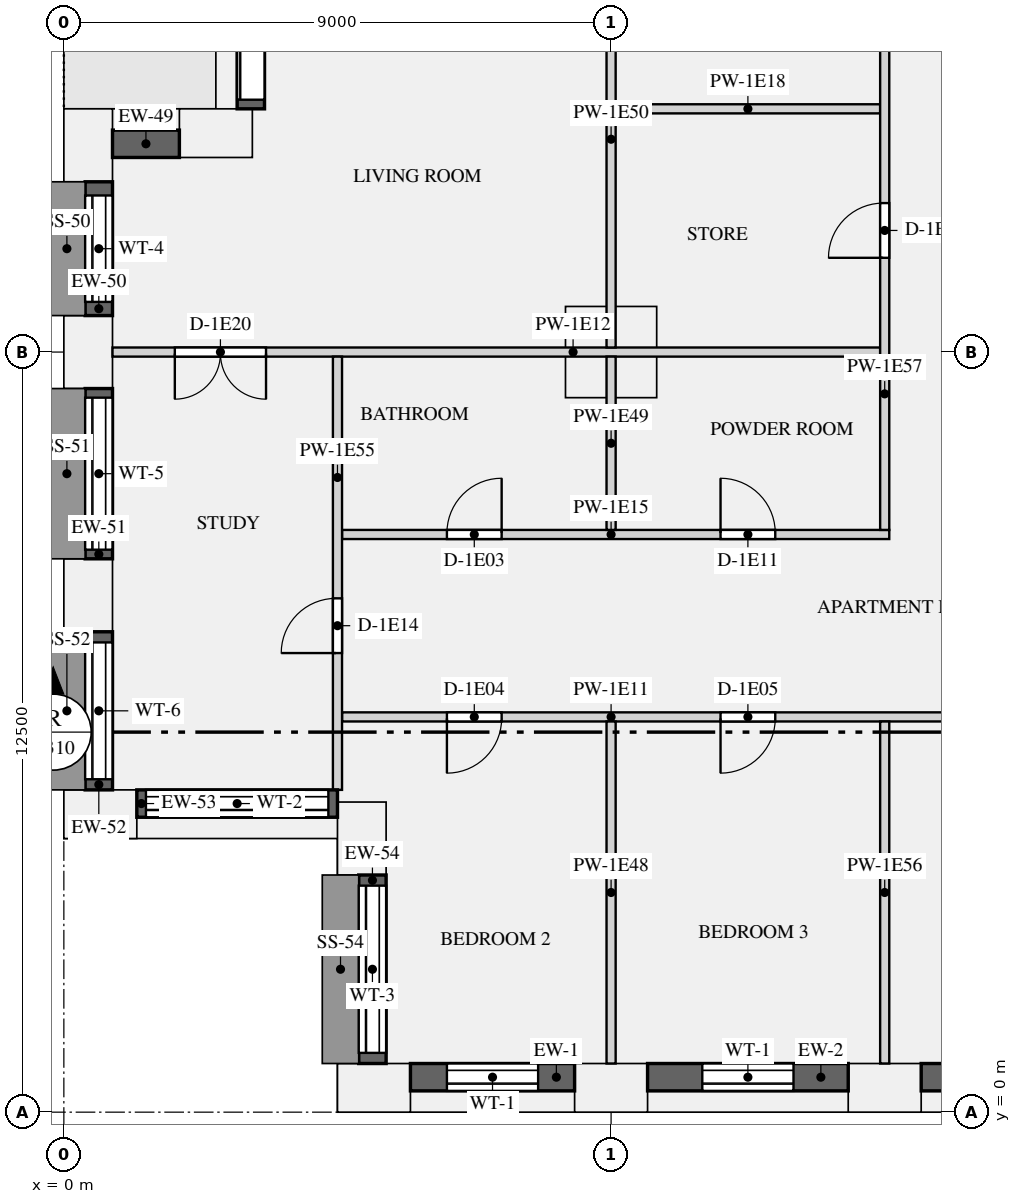
"""IFC4 building model, lengths in metres.
Left out: names, types, materials, properties, quantities, classifications, styles, units other than length and angle.
Written with IfcOpenShell. Run it as: python <this file> out.ifc"""

import sys

from ifc_helpers import new_model, si_unit, direction, frame, frame_2d, origin, origin_2d, place, context, subcontext, project, spatial, rectangle, extrude, element, fill, save


model = new_model("IFC4")
c1 = context("Model", 3, precision=1e-05, world=origin(), true_north=direction((0.0, 1.0)))
c2 = subcontext(c1, "Body", "Model", "MODEL_VIEW")
j1 = project(units=[si_unit("LENGTHUNIT", "METRE"), si_unit("PLANEANGLEUNIT", "RADIAN")], contexts=[c1])
p1 = place(None, origin())
s1 = spatial("IfcSite", under=j1, at=p1, CompositionType="ELEMENT")
p2 = place(p1, origin())
s2 = spatial("IfcBuilding", under=s1, at=p2, CompositionType="ELEMENT")
p3 = place(p2, frame((0.0, 0.0, 54.15)))
s3 = spatial("IfcBuildingStorey", under=s2, at=p3, CompositionType="ELEMENT", Elevation=54.15)
for number, where, z_axis, x_axis in (
    (1, (5.1, 0.4, 0.0), (0.0, 0.0, 1.0), (1.0, 0.0, 0.0)),
    (2, (9.0, 0.4, 0.0), (0.0, 0.0, 1.0), (1.0, 0.0, 0.0)),
    (3, (13.5, 0.4, 0.0), (0.0, 0.0, 1.0), (1.0, 0.0, 0.0)),
    (4, (2.5, 16.1, 0.0), (0.0, 0.0, 1.0), (-1.0, 0.0, 0.0)),
    (5, (0.4, 15.9, 0.0), (0.0, 0.0, 1.0), (0.0, -1.0, 0.0)),
    (6, (0.4, 12.5, 0.0), (0.0, 0.0, 1.0), (0.0, -1.0, 0.0)),
    (7, (0.4, 8.5, 0.0), (0.0, 0.0, 1.0), (0.0, -1.0, 0.0)),
    (8, (0.6, 4.9, 0.0), (0.0, 0.0, 1.0), (1.0, 0.0, 0.0)),
    (9, (4.9, 4.5, 0.0), (0.0, 0.0, 1.0), (0.0, -1.0, 0.0)),
):
    element("IfcColumn", number, at=place(p3, frame(where, z_axis=z_axis, x_axis=x_axis)), inside=s3, PredefinedType="USERDEFINED", context=c2, shape_type="SweptSolid", body=[
        extrude(rectangle(XDim=1.2, YDim=0.8, at=origin_2d()), origin(), (0.0, 0.0, 1.0), 3.15),
    ])
p4 = place(p3, frame((9.0, 12.5, 0.0), z_axis=(0.0, 0.0, 1.0), x_axis=(1.0, 0.0, 0.0)))
e10 = element("IfcColumn", 10, at=p4, inside=s3, PredefinedType="COLUMN", context=c2, shape_type="SweptSolid", body=[
    extrude(rectangle(XDim=1.5, YDim=1.5, at=origin_2d()), origin(), (0.0, 0.0, 1.0), 3.15),
])
p5 = place(p3, frame((5.7, 0.575, 0.9), z_axis=(0.0, 0.0, 1.0), x_axis=(1.0, 0.0, 0.0)))
e11 = element("IfcWall", 11, at=p5, inside=s3, PredefinedType="SOLIDWALL", context=c2, shape_type="SweptSolid", body=[
    extrude(rectangle(XDim=2.7, YDim=0.45, at=frame_2d((1.35, 0.0))), origin(), (0.0, 0.0, 1.0), 1.93),
])
p6 = place(p5, frame((0.6, 0.0, 0.15)))
e12 = element("IfcOpeningElement", 12, at=p6, cuts=e11, PredefinedType="OPENING", context=c2, shape_type="SweptSolid", body=[
    extrude(rectangle(XDim=1.5, YDim=1.5, at=frame_2d((0.75, 0.75))), frame((0.0, 0.235, 0.0), z_axis=(0.0, -1.0, 0.0), x_axis=(1.0, 0.0, 0.0)), (0.0, 0.0, 1.0), 0.47),
])
p7 = place(p3, frame((9.6, 0.575, 0.9), z_axis=(0.0, 0.0, 1.0), x_axis=(1.0, 0.0, 0.0)))
e13 = element("IfcWall", 13, at=p7, inside=s3, PredefinedType="SOLIDWALL", context=c2, shape_type="SweptSolid", body=[
    extrude(rectangle(XDim=3.3, YDim=0.45, at=frame_2d((1.65, 0.0))), origin(), (0.0, 0.0, 1.0), 1.93),
])
p8 = place(p7, frame((0.9, 0.0, 0.15)))
e14 = element("IfcOpeningElement", 14, at=p8, cuts=e13, PredefinedType="OPENING", context=c2, shape_type="SweptSolid", body=[
    extrude(rectangle(XDim=1.5, YDim=1.5, at=frame_2d((0.75, 0.75))), frame((0.0, 0.235, 0.0), z_axis=(0.0, -1.0, 0.0), x_axis=(1.0, 0.0, 0.0)), (0.0, 0.0, 1.0), 0.47),
])
p9 = place(p3, frame((14.1, 0.575, 0.9), z_axis=(0.0, 0.0, 1.0), x_axis=(1.0, 0.0, 0.0)))
e15 = element("IfcWall", 15, at=p9, inside=s3, PredefinedType="SOLIDWALL", context=c2, shape_type="SweptSolid", body=[
    extrude(rectangle(XDim=3.9, YDim=0.45, at=frame_2d((1.95, 0.0))), origin(), (0.0, 0.0, 1.0), 1.93),
])
p10 = place(p9, frame((1.2, 0.0, 0.15)))
e16 = element("IfcOpeningElement", 16, at=p10, cuts=e15, PredefinedType="OPENING", context=c2, shape_type="SweptSolid", body=[
    extrude(rectangle(XDim=1.5, YDim=1.5, at=frame_2d((0.75, 0.75))), frame((0.0, 0.235, 0.0), z_axis=(0.0, -1.0, 0.0), x_axis=(1.0, 0.0, 0.0)), (0.0, 0.0, 1.0), 0.47),
])
p11 = place(p3, frame((3.075, 19.9, 0.0), z_axis=(0.0, 0.0, 1.0), x_axis=(0.0, -1.0, 0.0)))
e17 = element("IfcWall", 17, at=p11, inside=s3, PredefinedType="SOLIDWALL", context=c2, shape_type="SweptSolid", body=[
    extrude(rectangle(XDim=3.4, YDim=0.45, at=frame_2d((1.7, 0.0))), origin(), (0.0, 0.0, 1.0), 2.83),
])
p12 = place(p11, frame((0.15, 0.0, 0.0)))
e18 = element("IfcOpeningElement", 18, at=p12, cuts=e17, PredefinedType="OPENING", context=c2, shape_type="SweptSolid", body=[
    extrude(rectangle(XDim=3.1, YDim=2.3, at=frame_2d((1.55, 1.15))), frame((0.0, 0.235, 0.0), z_axis=(0.0, -1.0, 0.0), x_axis=(1.0, 0.0, 0.0)), (0.0, 0.0, 1.0), 0.47),
])
p13 = place(p3, frame((1.9, 15.925, 0.9), z_axis=(0.0, 0.0, 1.0), x_axis=(-1.0, 0.0, 0.0)))
e19 = element("IfcWall", 19, at=p13, inside=s3, PredefinedType="SOLIDWALL", context=c2, shape_type="SweptSolid", body=[
    extrude(rectangle(XDim=1.1, YDim=0.45, at=frame_2d((0.55, 0.0))), origin(), (0.0, 0.0, 1.0), 1.93),
])
p14 = place(p3, frame((0.575, 15.3, 0.9), z_axis=(0.0, 0.0, 1.0), x_axis=(0.0, -1.0, 0.0)))
e20 = element("IfcWall", 20, at=p14, inside=s3, PredefinedType="SOLIDWALL", context=c2, shape_type="SweptSolid", body=[
    extrude(rectangle(XDim=2.2, YDim=0.45, at=frame_2d((1.1, 0.0))), origin(), (0.0, 0.0, 1.0), 1.93),
])
p15 = place(p14, frame((0.225, 0.0, 0.15)))
e21 = element("IfcOpeningElement", 21, at=p15, cuts=e20, PredefinedType="OPENING", context=c2, shape_type="SweptSolid", body=[
    extrude(rectangle(XDim=1.75, YDim=1.5, at=frame_2d((0.875, 0.75))), frame((0.0, 0.235, 0.0), z_axis=(0.0, -1.0, 0.0), x_axis=(1.0, 0.0, 0.0)), (0.0, 0.0, 1.0), 0.47),
])
p16 = place(p3, frame((0.575, 11.9, 0.9), z_axis=(0.0, 0.0, 1.0), x_axis=(0.0, -1.0, 0.0)))
e22 = element("IfcWall", 22, at=p16, inside=s3, PredefinedType="SOLIDWALL", context=c2, shape_type="SweptSolid", body=[
    extrude(rectangle(XDim=2.8, YDim=0.45, at=frame_2d((1.4, 0.0))), origin(), (0.0, 0.0, 1.0), 1.93),
])
p17 = place(p16, frame((0.15, 0.0, 0.15)))
e23 = element("IfcOpeningElement", 23, at=p17, cuts=e22, PredefinedType="OPENING", context=c2, shape_type="SweptSolid", body=[
    extrude(rectangle(XDim=2.5, YDim=1.5, at=frame_2d((1.25, 0.75))), frame((0.0, 0.235, 0.0), z_axis=(0.0, -1.0, 0.0), x_axis=(1.0, 0.0, 0.0)), (0.0, 0.0, 1.0), 0.47),
])
p18 = place(p3, frame((0.575, 7.9, 0.9), z_axis=(0.0, 0.0, 1.0), x_axis=(0.0, -1.0, 0.0)))
e24 = element("IfcWall", 24, at=p18, inside=s3, PredefinedType="SOLIDWALL", context=c2, shape_type="SweptSolid", body=[
    extrude(rectangle(XDim=2.6, YDim=0.45, at=frame_2d((1.3, 0.0))), origin(), (0.0, 0.0, 1.0), 1.93),
])
p19 = place(p18, frame((0.175, 0.0, 0.15)))
e25 = element("IfcOpeningElement", 25, at=p19, cuts=e24, PredefinedType="OPENING", context=c2, shape_type="SweptSolid", body=[
    extrude(rectangle(XDim=2.25, YDim=1.5, at=frame_2d((1.125, 0.75))), frame((0.0, 0.235, 0.0), z_axis=(0.0, -1.0, 0.0), x_axis=(1.0, 0.0, 0.0)), (0.0, 0.0, 1.0), 0.47),
])
p20 = place(p3, frame((1.2, 5.075, 0.9), z_axis=(0.0, 0.0, 1.0), x_axis=(1.0, 0.0, 0.0)))
e26 = element("IfcWall", 26, at=p20, inside=s3, PredefinedType="SOLIDWALL", context=c2, shape_type="SweptSolid", body=[
    extrude(rectangle(XDim=3.3, YDim=0.45, at=frame_2d((1.65, 0.0))), origin(), (0.0, 0.0, 1.0), 1.93),
])
p21 = place(p20, frame((0.15, 0.0, 0.15)))
e27 = element("IfcOpeningElement", 27, at=p21, cuts=e26, PredefinedType="OPENING", context=c2, shape_type="SweptSolid", body=[
    extrude(rectangle(XDim=3.0, YDim=1.5, at=frame_2d((1.5, 0.75))), frame((0.0, 0.235, 0.0), z_axis=(0.0, -1.0, 0.0), x_axis=(1.0, 0.0, 0.0)), (0.0, 0.0, 1.0), 0.47),
])
p22 = place(p3, frame((5.075, 3.9, 0.9), z_axis=(0.0, 0.0, 1.0), x_axis=(0.0, -1.0, 0.0)))
e28 = element("IfcWall", 28, at=p22, inside=s3, PredefinedType="SOLIDWALL", context=c2, shape_type="SweptSolid", body=[
    extrude(rectangle(XDim=3.1, YDim=0.45, at=frame_2d((1.55, 0.0))), origin(), (0.0, 0.0, 1.0), 1.93),
])
p23 = place(p22, frame((0.175, 0.0, 0.15)))
e29 = element("IfcOpeningElement", 29, at=p23, cuts=e28, PredefinedType="OPENING", context=c2, shape_type="SweptSolid", body=[
    extrude(rectangle(XDim=2.75, YDim=1.5, at=frame_2d((1.375, 0.75))), frame((0.0, 0.235, 0.0), z_axis=(0.0, -1.0, 0.0), x_axis=(1.0, 0.0, 0.0)), (0.0, 0.0, 1.0), 0.47),
])
p24 = place(p3, frame((4.575, 6.5, 0.0), z_axis=(0.0, 0.0, 1.0), x_axis=(1.0, 0.0, 0.0)))
e30 = element("IfcWall", 30, at=p24, inside=s3, PredefinedType="PARTITIONING", context=c2, shape_type="SweptSolid", body=[
    extrude(rectangle(XDim=13.425, YDim=0.15, at=frame_2d((6.712, 0.0))), origin(), (0.0, 0.0, 1.0), 2.83),
])
p25 = place(p24, frame((1.725, 0.0, 0.0)))
e31 = element("IfcOpeningElement", 31, at=p25, cuts=e30, PredefinedType="OPENING", context=c2, shape_type="SweptSolid", body=[
    extrude(rectangle(XDim=0.9, YDim=2.1, at=frame_2d((0.45, 1.05))), frame((0.0, 0.085, 0.0), z_axis=(0.0, -1.0, 0.0), x_axis=(1.0, 0.0, 0.0)), (0.0, 0.0, 1.0), 0.17),
])
p26 = place(p24, frame((6.225, 0.0, 0.0)))
e32 = element("IfcOpeningElement", 32, at=p26, cuts=e30, PredefinedType="OPENING", context=c2, shape_type="SweptSolid", body=[
    extrude(rectangle(XDim=0.9, YDim=2.1, at=frame_2d((0.45, 1.05))), frame((0.0, 0.085, 0.0), z_axis=(0.0, -1.0, 0.0), x_axis=(1.0, 0.0, 0.0)), (0.0, 0.0, 1.0), 0.17),
])
p27 = place(p24, frame((10.725, 0.0, 0.0)))
e33 = element("IfcOpeningElement", 33, at=p27, cuts=e30, PredefinedType="OPENING", context=c2, shape_type="SweptSolid", body=[
    extrude(rectangle(XDim=0.9, YDim=2.1, at=frame_2d((0.45, 1.05))), frame((0.0, 0.085, 0.0), z_axis=(0.0, -1.0, 0.0), x_axis=(1.0, 0.0, 0.0)), (0.0, 0.0, 1.0), 0.17),
])
p28 = place(p3, frame((0.8, 12.5, 0.0), z_axis=(0.0, 0.0, 1.0), x_axis=(1.0, 0.0, 0.0)))
e34 = element("IfcWall", 34, at=p28, inside=s3, PredefinedType="PARTITIONING", context=c2, shape_type="SweptSolid", body=[
    extrude(rectangle(XDim=12.625, YDim=0.15, at=frame_2d((6.312, 0.0))), origin(), (0.0, 0.0, 1.0), 2.83),
])
p29 = place(p28, frame((1.025, 0.0, 0.0)))
e35 = element("IfcOpeningElement", 35, at=p29, cuts=e34, PredefinedType="OPENING", context=c2, shape_type="SweptSolid", body=[
    extrude(rectangle(XDim=1.5, YDim=2.1, at=frame_2d((0.75, 1.05))), frame((0.0, 0.085, 0.0), z_axis=(0.0, -1.0, 0.0), x_axis=(1.0, 0.0, 0.0)), (0.0, 0.0, 1.0), 0.17),
])
p30 = place(p3, frame((4.575, 9.5, 0.0), z_axis=(0.0, 0.0, 1.0), x_axis=(1.0, 0.0, 0.0)))
e36 = element("IfcWall", 36, at=p30, inside=s3, PredefinedType="PARTITIONING", context=c2, shape_type="SweptSolid", body=[
    extrude(rectangle(XDim=9.0, YDim=0.15, at=frame_2d((4.5, 0.0))), origin(), (0.0, 0.0, 1.0), 2.83),
])
p31 = place(p30, frame((1.725, 0.0, 0.0)))
e37 = element("IfcOpeningElement", 37, at=p31, cuts=e36, PredefinedType="OPENING", context=c2, shape_type="SweptSolid", body=[
    extrude(rectangle(XDim=0.9, YDim=2.1, at=frame_2d((0.45, 1.05))), frame((0.0, 0.085, 0.0), z_axis=(0.0, -1.0, 0.0), x_axis=(1.0, 0.0, 0.0)), (0.0, 0.0, 1.0), 0.17),
])
p32 = place(p30, frame((6.225, 0.0, 0.0)))
e38 = element("IfcOpeningElement", 38, at=p32, cuts=e36, PredefinedType="OPENING", context=c2, shape_type="SweptSolid", body=[
    extrude(rectangle(XDim=0.9, YDim=2.1, at=frame_2d((0.45, 1.05))), frame((0.0, 0.085, 0.0), z_axis=(0.0, -1.0, 0.0), x_axis=(1.0, 0.0, 0.0)), (0.0, 0.0, 1.0), 0.17),
])
p33 = place(p3, frame((9.075, 16.5, 0.0), z_axis=(0.0, 0.0, 1.0), x_axis=(1.0, 0.0, 0.0)))
e39 = element("IfcWall", 39, at=p33, inside=s3, PredefinedType="PARTITIONING", context=c2, shape_type="SweptSolid", body=[
    extrude(rectangle(XDim=4.35, YDim=0.15, at=frame_2d((2.175, 0.0))), origin(), (0.0, 0.0, 1.0), 2.83),
])
p34 = place(p3, frame((9.0, 0.8, 0.0), z_axis=(0.0, 0.0, 1.0), x_axis=(0.0, 1.0, 0.0)))
e40 = element("IfcWall", 40, at=p34, inside=s3, PredefinedType="PARTITIONING", context=c2, shape_type="SweptSolid", body=[
    extrude(rectangle(XDim=5.625, YDim=0.15, at=frame_2d((2.812, 0.0))), origin(), (0.0, 0.0, 1.0), 2.83),
])
p35 = place(p3, frame((9.0, 9.575, 0.0), z_axis=(0.0, 0.0, 1.0), x_axis=(0.0, 1.0, 0.0)))
e41 = element("IfcWall", 41, at=p35, inside=s3, PredefinedType="PARTITIONING", context=c2, shape_type="SweptSolid", body=[
    extrude(rectangle(XDim=2.85, YDim=0.15, at=frame_2d((1.425, 0.0))), origin(), (0.0, 0.0, 1.0), 2.83),
])
p36 = place(p3, frame((9.0, 12.575, 0.0), z_axis=(0.0, 0.0, 1.0), x_axis=(0.0, 1.0, 0.0)))
e42 = element("IfcWall", 42, at=p36, inside=s3, PredefinedType="PARTITIONING", context=c2, shape_type="SweptSolid", body=[
    extrude(rectangle(XDim=11.35, YDim=0.15, at=frame_2d((5.675, 0.0))), origin(), (0.0, 0.0, 1.0), 2.83),
])
p37 = place(p36, frame((6.85, 0.0, 0.0)))
e43 = element("IfcOpeningElement", 43, at=p37, cuts=e42, PredefinedType="OPENING", context=c2, shape_type="SweptSolid", body=[
    extrude(rectangle(XDim=0.9, YDim=2.1, at=frame_2d((0.45, 1.05))), frame((0.0, 0.085, 0.0), z_axis=(0.0, -1.0, 0.0), x_axis=(1.0, 0.0, 0.0)), (0.0, 0.0, 1.0), 0.17),
])
p38 = place(p3, frame((4.5, 5.3, 0.0), z_axis=(0.0, 0.0, 1.0), x_axis=(0.0, 1.0, 0.0)))
e44 = element("IfcWall", 44, at=p38, inside=s3, PredefinedType="PARTITIONING", context=c2, shape_type="SweptSolid", body=[
    extrude(rectangle(XDim=7.125, YDim=0.15, at=frame_2d((3.562, 0.0))), origin(), (0.0, 0.0, 1.0), 2.83),
])
p39 = place(p38, frame((2.25, 0.0, 0.0)))
e45 = element("IfcOpeningElement", 45, at=p39, cuts=e44, PredefinedType="OPENING", context=c2, shape_type="SweptSolid", body=[
    extrude(rectangle(XDim=0.9, YDim=2.1, at=frame_2d((0.45, 1.05))), frame((0.0, 0.085, 0.0), z_axis=(0.0, -1.0, 0.0), x_axis=(1.0, 0.0, 0.0)), (0.0, 0.0, 1.0), 0.17),
])
p40 = place(p3, frame((13.5, 0.8, 0.0), z_axis=(0.0, 0.0, 1.0), x_axis=(0.0, 1.0, 0.0)))
e46 = element("IfcWall", 46, at=p40, inside=s3, PredefinedType="PARTITIONING", context=c2, shape_type="SweptSolid", body=[
    extrude(rectangle(XDim=5.625, YDim=0.15, at=frame_2d((2.812, 0.0))), origin(), (0.0, 0.0, 1.0), 2.83),
])
p41 = place(p3, frame((13.5, 9.575, 0.0), z_axis=(0.0, 0.0, 1.0), x_axis=(0.0, 1.0, 0.0)))
e47 = element("IfcWall", 47, at=p41, inside=s3, PredefinedType="PARTITIONING", context=c2, shape_type="SweptSolid", body=[
    extrude(rectangle(XDim=13.325, YDim=0.15, at=frame_2d((6.663, 0.0))), origin(), (0.0, 0.0, 1.0), 2.83),
])
p42 = place(p41, frame((8.475, 0.0, 0.0)))
e48 = element("IfcOpeningElement", 48, at=p42, cuts=e47, PredefinedType="OPENING", context=c2, shape_type="SweptSolid", body=[
    extrude(rectangle(XDim=0.9, YDim=2.1, at=frame_2d((0.45, 1.05))), frame((0.0, 0.085, 0.0), z_axis=(0.0, -1.0, 0.0), x_axis=(1.0, 0.0, 0.0)), (0.0, 0.0, 1.0), 0.17),
])
p43 = place(p41, frame((4.475, 0.0, 0.0)))
e49 = element("IfcOpeningElement", 49, at=p43, cuts=e47, PredefinedType="OPENING", context=c2, shape_type="SweptSolid", body=[
    extrude(rectangle(XDim=0.9, YDim=2.1, at=frame_2d((0.45, 1.05))), frame((0.0, 0.085, 0.0), z_axis=(0.0, -1.0, 0.0), x_axis=(1.0, 0.0, 0.0)), (0.0, 0.0, 1.0), 0.17),
])
p44 = place(p6, origin())
e50 = element("IfcWindow", 50, at=p44, inside=s3, PartitioningType="SINGLE_PANEL", PredefinedType="WINDOW", context=c2, shape_type="SweptSolid", body=[
    extrude(rectangle(XDim=1.5, YDim=1.5, at=frame_2d((0.75, 0.75))), frame((0.0, -0.065, 0.0), z_axis=(0.0, -1.0, 0.0), x_axis=(1.0, 0.0, 0.0)), (0.0, 0.0, 1.0), 0.06),
])
fill(e12, e50)
p45 = place(p8, origin())
e51 = element("IfcWindow", 51, at=p45, inside=s3, PartitioningType="SINGLE_PANEL", PredefinedType="WINDOW", context=c2, shape_type="SweptSolid", body=[
    extrude(rectangle(XDim=1.5, YDim=1.5, at=frame_2d((0.75, 0.75))), frame((0.0, -0.065, 0.0), z_axis=(0.0, -1.0, 0.0), x_axis=(1.0, 0.0, 0.0)), (0.0, 0.0, 1.0), 0.06),
])
fill(e14, e51)
p46 = place(p12, origin())
e52 = element("IfcDoor", 52, at=p46, inside=s3, OperationType="SLIDING_TO_LEFT", PredefinedType="DOOR", context=c2, shape_type="SweptSolid", body=[
    extrude(rectangle(XDim=3.1, YDim=2.3, at=frame_2d((1.55, 1.15))), frame((0.0, -0.07, 0.0), z_axis=(0.0, -1.0, 0.0), x_axis=(1.0, 0.0, 0.0)), (0.0, 0.0, 1.0), 0.05),
])
fill(e18, e52)
p47 = place(p15, origin())
e53 = element("IfcWindow", 53, at=p47, inside=s3, PartitioningType="SINGLE_PANEL", PredefinedType="WINDOW", context=c2, shape_type="SweptSolid", body=[
    extrude(rectangle(XDim=1.75, YDim=1.5, at=frame_2d((0.875, 0.75))), frame((0.0, -0.065, 0.0), z_axis=(0.0, -1.0, 0.0), x_axis=(1.0, 0.0, 0.0)), (0.0, 0.0, 1.0), 0.06),
])
fill(e21, e53)
p48 = place(p17, origin())
e54 = element("IfcWindow", 54, at=p48, inside=s3, PartitioningType="SINGLE_PANEL", PredefinedType="WINDOW", context=c2, shape_type="SweptSolid", body=[
    extrude(rectangle(XDim=2.5, YDim=1.5, at=frame_2d((1.25, 0.75))), frame((0.0, -0.065, 0.0), z_axis=(0.0, -1.0, 0.0), x_axis=(1.0, 0.0, 0.0)), (0.0, 0.0, 1.0), 0.06),
])
fill(e23, e54)
p49 = place(p19, origin())
e55 = element("IfcWindow", 55, at=p49, inside=s3, PartitioningType="SINGLE_PANEL", PredefinedType="WINDOW", context=c2, shape_type="SweptSolid", body=[
    extrude(rectangle(XDim=2.25, YDim=1.5, at=frame_2d((1.125, 0.75))), frame((0.0, -0.065, 0.0), z_axis=(0.0, -1.0, 0.0), x_axis=(1.0, 0.0, 0.0)), (0.0, 0.0, 1.0), 0.06),
])
fill(e25, e55)
p50 = place(p21, origin())
e56 = element("IfcWindow", 56, at=p50, inside=s3, PartitioningType="SINGLE_PANEL", PredefinedType="WINDOW", context=c2, shape_type="SweptSolid", body=[
    extrude(rectangle(XDim=3.0, YDim=1.5, at=frame_2d((1.5, 0.75))), frame((0.0, -0.065, 0.0), z_axis=(0.0, -1.0, 0.0), x_axis=(1.0, 0.0, 0.0)), (0.0, 0.0, 1.0), 0.06),
])
fill(e27, e56)
p51 = place(p23, origin())
e57 = element("IfcWindow", 57, at=p51, inside=s3, PartitioningType="SINGLE_PANEL", PredefinedType="WINDOW", context=c2, shape_type="SweptSolid", body=[
    extrude(rectangle(XDim=2.75, YDim=1.5, at=frame_2d((1.375, 0.75))), frame((0.0, -0.065, 0.0), z_axis=(0.0, -1.0, 0.0), x_axis=(1.0, 0.0, 0.0)), (0.0, 0.0, 1.0), 0.06),
])
fill(e29, e57)
p52 = place(p31, origin())
e58 = element("IfcDoor", 58, at=p52, inside=s3, OperationType="SINGLE_SWING_RIGHT", PredefinedType="DOOR", context=c2, shape_type="SweptSolid", body=[
    extrude(rectangle(XDim=0.9, YDim=2.1, at=frame_2d((0.45, 1.05))), frame((0.0, 0.025, 0.0), z_axis=(0.0, -1.0, 0.0), x_axis=(1.0, 0.0, 0.0)), (0.0, 0.0, 1.0), 0.05),
])
fill(e37, e58)
p53 = place(p25, frame((0.9, 0.0, 0.0), z_axis=(0.0, 0.0, 1.0), x_axis=(-1.0, 0.0, 0.0)))
e59 = element("IfcDoor", 59, at=p53, inside=s3, OperationType="SINGLE_SWING_RIGHT", PredefinedType="DOOR", context=c2, shape_type="SweptSolid", body=[
    extrude(rectangle(XDim=0.9, YDim=2.1, at=frame_2d((0.45, 1.05))), frame((0.0, 0.025, 0.0), z_axis=(0.0, -1.0, 0.0), x_axis=(1.0, 0.0, 0.0)), (0.0, 0.0, 1.0), 0.05),
])
fill(e31, e59)
p54 = place(p26, frame((0.9, 0.0, 0.0), z_axis=(0.0, 0.0, 1.0), x_axis=(-1.0, 0.0, 0.0)))
e60 = element("IfcDoor", 60, at=p54, inside=s3, OperationType="SINGLE_SWING_RIGHT", PredefinedType="DOOR", context=c2, shape_type="SweptSolid", body=[
    extrude(rectangle(XDim=0.9, YDim=2.1, at=frame_2d((0.45, 1.05))), frame((0.0, 0.025, 0.0), z_axis=(0.0, -1.0, 0.0), x_axis=(1.0, 0.0, 0.0)), (0.0, 0.0, 1.0), 0.05),
])
fill(e32, e60)
p55 = place(p32, origin())
e61 = element("IfcDoor", 61, at=p55, inside=s3, OperationType="SINGLE_SWING_LEFT", PredefinedType="DOOR", context=c2, shape_type="SweptSolid", body=[
    extrude(rectangle(XDim=0.9, YDim=2.1, at=frame_2d((0.45, 1.05))), frame((0.0, 0.025, 0.0), z_axis=(0.0, -1.0, 0.0), x_axis=(1.0, 0.0, 0.0)), (0.0, 0.0, 1.0), 0.05),
])
fill(e38, e61)
p56 = place(p43, origin())
e62 = element("IfcDoor", 62, at=p56, inside=s3, OperationType="SINGLE_SWING_LEFT", PredefinedType="DOOR", context=c2, shape_type="SweptSolid", body=[
    extrude(rectangle(XDim=0.9, YDim=2.1, at=frame_2d((0.45, 1.05))), frame((0.0, 0.025, 0.0), z_axis=(0.0, -1.0, 0.0), x_axis=(1.0, 0.0, 0.0)), (0.0, 0.0, 1.0), 0.05),
])
fill(e49, e62)
p57 = place(p39, origin())
e63 = element("IfcDoor", 63, at=p57, inside=s3, OperationType="SINGLE_SWING_LEFT", PredefinedType="DOOR", context=c2, shape_type="SweptSolid", body=[
    extrude(rectangle(XDim=0.9, YDim=2.1, at=frame_2d((0.45, 1.05))), frame((0.0, 0.025, 0.0), z_axis=(0.0, -1.0, 0.0), x_axis=(1.0, 0.0, 0.0)), (0.0, 0.0, 1.0), 0.05),
])
fill(e45, e63)
p58 = place(p29, frame((1.5, 0.0, 0.0), z_axis=(0.0, 0.0, 1.0), x_axis=(-1.0, 0.0, 0.0)))
e64 = element("IfcDoor", 64, at=p58, inside=s3, OperationType="DOUBLE_DOOR_SINGLE_SWING", PredefinedType="DOOR", context=c2, shape_type="SweptSolid", body=[
    extrude(rectangle(XDim=1.5, YDim=2.1, at=frame_2d((0.75, 1.05))), frame((0.0, 0.025, 0.0), z_axis=(0.0, -1.0, 0.0), x_axis=(1.0, 0.0, 0.0)), (0.0, 0.0, 1.0), 0.05),
])
fill(e35, e64)
save(model, sys.argv[1])
